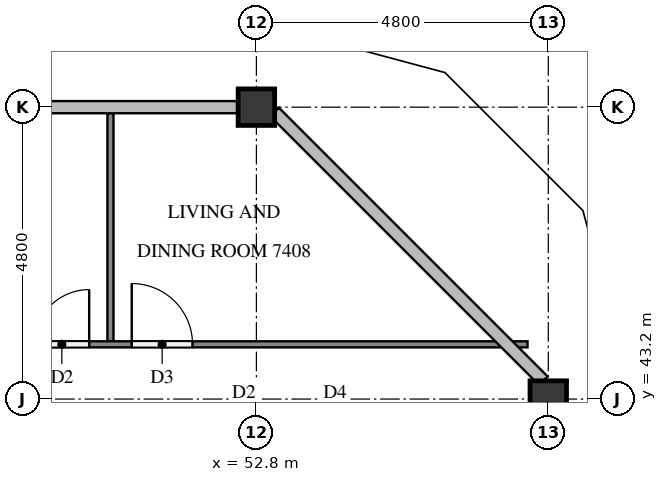
"""IFC4 building model, lengths in metres.
Left out: names, types, materials, properties, quantities, classifications, styles, units other than length and angle.
Written with IfcOpenShell. Run it as: python <this file> out.ifc"""

import sys

from ifc_helpers import new_model, si_unit, direction, frame, frame_2d, origin, origin_2d, place, context, subcontext, project, spatial, rectangle, extrude, element, fill, save


model = new_model("IFC4")
c1 = context("Model", 3, precision=1e-05, world=origin(), true_north=direction((0.0, 1.0)))
c2 = subcontext(c1, "Body", "Model", "MODEL_VIEW")
j1 = project(units=[si_unit("LENGTHUNIT", "METRE"), si_unit("PLANEANGLEUNIT", "RADIAN")], contexts=[c1])
p1 = place(None, origin())
s1 = spatial("IfcSite", under=j1, at=p1, CompositionType="ELEMENT")
p2 = place(p1, origin())
s2 = spatial("IfcBuilding", under=s1, at=p2, CompositionType="ELEMENT")
p3 = place(p2, frame((0.0, 0.0, 282.6)))
s3 = spatial("IfcBuildingStorey", under=s2, at=p3, CompositionType="ELEMENT", Elevation=282.6)
for number, where, z_axis, x_axis in (
    (1, (57.6, 43.2, 0.0), (0.0, 0.0, 1.0), (1.0, 0.0, 0.0)),
    (2, (52.8, 48.0, 0.0), (0.0, 0.0, 1.0), (1.0, 0.0, 0.0)),
):
    element("IfcColumn", number, at=place(p3, frame(where, z_axis=z_axis, x_axis=x_axis)), inside=s3, PredefinedType="COLUMN", context=c2, shape_type="SweptSolid", body=[
        extrude(rectangle(XDim=0.6, YDim=0.6, at=origin_2d()), origin(), (0.0, 0.0, 1.0), 3.2),
    ])
p4 = place(p3, frame((50.4, 44.15, 0.0), z_axis=(0.0, 0.0, 1.0), x_axis=(0.0, 1.0, 0.0)))
e3 = element("IfcWall", 3, at=p4, inside=s3, PredefinedType="PARTITIONING", context=c2, shape_type="SweptSolid", body=[
    extrude(rectangle(XDim=3.75, YDim=0.1, at=frame_2d((1.875, 0.0))), origin(), (0.0, 0.0, 1.0), 3.2),
])
p5 = place(p3, frame((45.7, 44.1, 0.0), z_axis=(0.0, 0.0, 1.0), x_axis=(1.0, 0.0, 0.0)))
e4 = element("IfcWall", 4, at=p5, inside=s3, PredefinedType="PARTITIONING", context=c2, shape_type="SweptSolid", body=[
    extrude(rectangle(XDim=11.559, YDim=0.1, at=frame_2d((5.779, 0.0))), origin(), (0.0, 0.0, 1.0), 3.2),
])
p6 = place(p5, frame((3.45, 0.0, 0.0)))
e5 = element("IfcOpeningElement", 5, at=p6, cuts=e4, PredefinedType="OPENING", context=c2, shape_type="SweptSolid", body=[
    extrude(rectangle(XDim=0.9, YDim=2.1, at=frame_2d((0.45, 1.05))), frame((0.0, 0.06, 0.0), z_axis=(0.0, -1.0, 0.0), x_axis=(1.0, 0.0, 0.0)), (0.0, 0.0, 1.0), 0.12),
])
p7 = place(p5, frame((5.05, 0.0, 0.0)))
e6 = element("IfcOpeningElement", 6, at=p7, cuts=e4, PredefinedType="OPENING", context=c2, shape_type="SweptSolid", body=[
    extrude(rectangle(XDim=1.0, YDim=2.1, at=frame_2d((0.5, 1.05))), frame((0.0, 0.06, 0.0), z_axis=(0.0, -1.0, 0.0), x_axis=(1.0, 0.0, 0.0)), (0.0, 0.0, 1.0), 0.12),
])
p8 = place(p6, origin())
e7 = element("IfcDoor", 7, at=p8, inside=s3, OperationType="SINGLE_SWING_RIGHT", PredefinedType="DOOR", context=c2, shape_type="SweptSolid", body=[
    extrude(rectangle(XDim=0.9, YDim=2.1, at=frame_2d((0.45, 1.05))), frame((0.0, 0.025, 0.0), z_axis=(0.0, -1.0, 0.0), x_axis=(1.0, 0.0, 0.0)), (0.0, 0.0, 1.0), 0.05),
])
fill(e5, e7)
p9 = place(p7, origin())
e8 = element("IfcDoor", 8, at=p9, inside=s3, OperationType="SINGLE_SWING_LEFT", PredefinedType="DOOR", context=c2, shape_type="SweptSolid", body=[
    extrude(rectangle(XDim=1.0, YDim=2.1, at=frame_2d((0.5, 1.05))), frame((0.0, 0.025, 0.0), z_axis=(0.0, -1.0, 0.0), x_axis=(1.0, 0.0, 0.0)), (0.0, 0.0, 1.0), 0.05),
])
fill(e6, e8)
save(model, sys.argv[1])
